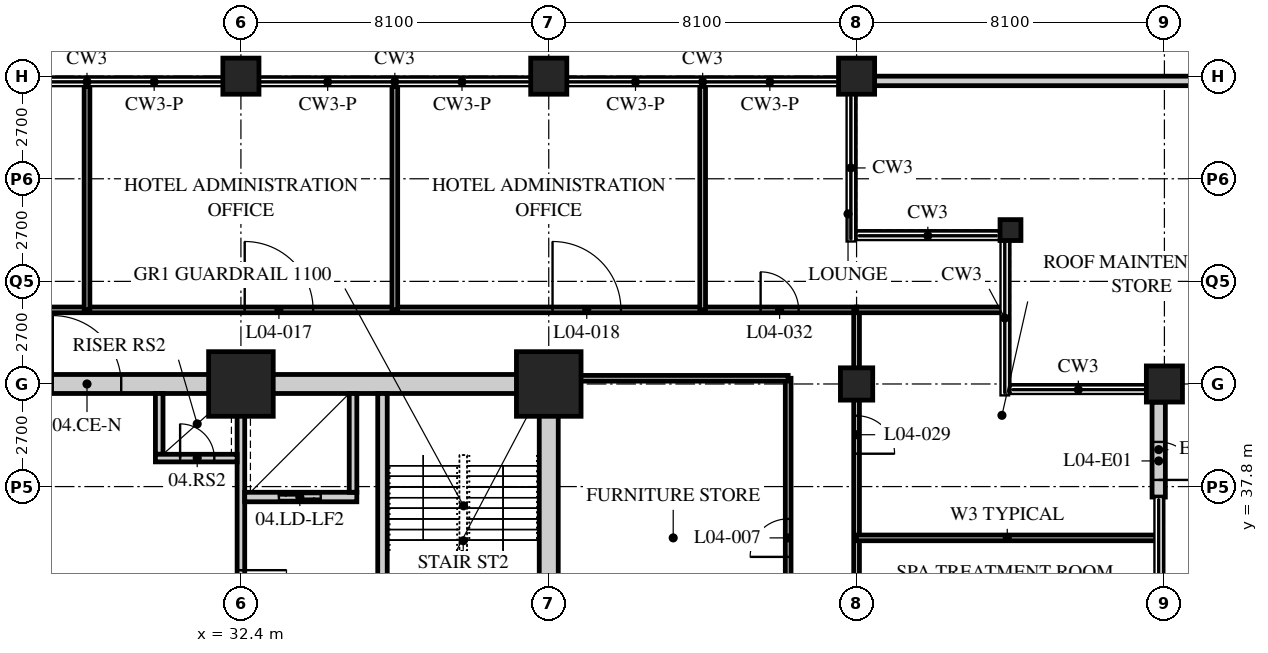
"""IFC4 building model, lengths in metres.
Left out: names, types, materials, properties, quantities, classifications, styles, units other than length and angle.
Written with IfcOpenShell. Run it as: python <this file> out.ifc"""

import sys

from ifc_helpers import new_model, si_unit, direction, frame, frame_2d, origin, origin_2d, place, context, subcontext, project, spatial, rectangle, hollow_rectangle, extrude, element, fill, save


model = new_model("IFC4")
c1 = context("Model", 3, precision=1e-05, world=origin(), true_north=direction((0.0, 1.0)))
c2 = subcontext(c1, "Body", "Model", "MODEL_VIEW")
j1 = project(units=[si_unit("LENGTHUNIT", "METRE"), si_unit("PLANEANGLEUNIT", "RADIAN")], contexts=[c1])
p1 = place(None, origin())
s1 = spatial("IfcSite", under=j1, at=p1, CompositionType="ELEMENT")
p2 = place(p1, origin())
s2 = spatial("IfcBuilding", under=s1, at=p2, CompositionType="ELEMENT")
p3 = place(p2, frame((0.0, 0.0, 22.2)))
s3 = spatial("IfcBuildingStorey", under=s2, at=p3, CompositionType="ELEMENT", Elevation=22.2)
p4 = place(p3, frame((32.4, 40.5, 0.0), z_axis=(0.0, 0.0, 1.0), x_axis=(1.0, 0.0, 0.0)))
e1 = element("IfcColumn", 1, at=p4, inside=s3, PredefinedType="COLUMN", context=c2, shape_type="SweptSolid", body=[
    extrude(hollow_rectangle(XDim=1.7, YDim=1.7, WallThickness=0.16, at=origin_2d()), origin(), (0.0, 0.0, 1.0), 5.4),
])
p5 = place(p3, frame((32.4, 48.6, 0.0), z_axis=(0.0, 0.0, 1.0), x_axis=(1.0, 0.0, 0.0)))
e2 = element("IfcColumn", 2, at=p5, inside=s3, PredefinedType="COLUMN", context=c2, shape_type="SweptSolid", body=[
    extrude(hollow_rectangle(XDim=0.95, YDim=0.95, WallThickness=0.1, at=origin_2d()), origin(), (0.0, 0.0, 1.0), 5.4),
])
p6 = place(p3, frame((40.5, 40.5, 0.0), z_axis=(0.0, 0.0, 1.0), x_axis=(1.0, 0.0, 0.0)))
e3 = element("IfcColumn", 3, at=p6, inside=s3, PredefinedType="COLUMN", context=c2, shape_type="SweptSolid", body=[
    extrude(hollow_rectangle(XDim=1.7, YDim=1.7, WallThickness=0.16, at=origin_2d()), origin(), (0.0, 0.0, 1.0), 5.4),
])
p7 = place(p3, frame((40.5, 48.6, 0.0), z_axis=(0.0, 0.0, 1.0), x_axis=(1.0, 0.0, 0.0)))
e4 = element("IfcColumn", 4, at=p7, inside=s3, PredefinedType="COLUMN", context=c2, shape_type="SweptSolid", body=[
    extrude(hollow_rectangle(XDim=0.95, YDim=0.95, WallThickness=0.1, at=origin_2d()), origin(), (0.0, 0.0, 1.0), 5.4),
])
p8 = place(p3, frame((48.6, 40.5, 0.0), z_axis=(0.0, 0.0, 1.0), x_axis=(1.0, 0.0, 0.0)))
e5 = element("IfcColumn", 5, at=p8, inside=s3, PredefinedType="COLUMN", context=c2, shape_type="SweptSolid", body=[
    extrude(hollow_rectangle(XDim=0.85, YDim=0.85, WallThickness=0.085, at=origin_2d()), origin(), (0.0, 0.0, 1.0), 5.4),
])
p9 = place(p3, frame((48.6, 48.6, 0.0), z_axis=(0.0, 0.0, 1.0), x_axis=(1.0, 0.0, 0.0)))
e6 = element("IfcColumn", 6, at=p9, inside=s3, PredefinedType="COLUMN", context=c2, shape_type="SweptSolid", body=[
    extrude(hollow_rectangle(XDim=0.95, YDim=0.95, WallThickness=0.1, at=origin_2d()), origin(), (0.0, 0.0, 1.0), 5.4),
])
p10 = place(p3, frame((52.65, 44.55, 0.0), z_axis=(0.0, 0.0, 1.0), x_axis=(1.0, 0.0, 0.0)))
e7 = element("IfcColumn", 7, at=p10, inside=s3, PredefinedType="COLUMN", context=c2, shape_type="SweptSolid", body=[
    extrude(hollow_rectangle(XDim=0.55, YDim=0.55, WallThickness=0.05, at=origin_2d()), origin(), (0.0, 0.0, 1.0), 5.4),
])
p11 = place(p3, frame((56.7, 40.5, 0.0), z_axis=(0.0, 0.0, 1.0), x_axis=(1.0, 0.0, 0.0)))
e8 = element("IfcColumn", 8, at=p11, inside=s3, PredefinedType="COLUMN", context=c2, shape_type="SweptSolid", body=[
    extrude(hollow_rectangle(XDim=0.95, YDim=0.95, WallThickness=0.1, at=origin_2d()), origin(), (0.0, 0.0, 1.0), 5.4),
])
p12 = place(p3, frame((56.55, 37.525, 0.0), z_axis=(0.0, 0.0, 1.0), x_axis=(0.0, 1.0, 0.0)))
e9 = element("IfcWall", 9, at=p12, inside=s3, PredefinedType="SOLIDWALL", context=c2, shape_type="SweptSolid", body=[
    extrude(rectangle(XDim=2.495, YDim=0.35, at=frame_2d((1.248, 0.0))), origin(), (0.0, 0.0, 1.0), 4.428),
])
p13 = place(p12, frame((0.45, 0.0, 0.0)))
e10 = element("IfcOpeningElement", 10, at=p13, cuts=e9, PredefinedType="OPENING", context=c2, shape_type="SweptSolid", body=[
    extrude(rectangle(XDim=1.0, YDim=2.1, at=frame_2d((0.5, 1.05))), frame((0.0, 0.185, 0.0), z_axis=(0.0, -1.0, 0.0), x_axis=(1.0, 0.0, 0.0)), (0.0, 0.0, 1.0), 0.37),
])
p14 = place(p3, frame((64.55, 48.475, 0.0), z_axis=(0.0, 0.0, 1.0), x_axis=(-1.0, 0.0, 0.0)))
e11 = element("IfcWall", 11, at=p14, inside=s3, PredefinedType="PARAPET", context=c2, shape_type="SweptSolid", body=[
    extrude(rectangle(XDim=15.95, YDim=0.25, at=frame_2d((7.975, 0.0))), origin(), (0.0, 0.0, 1.0), 1.38),
])
p15 = place(p3, frame((8.1, 42.45, 0.0), z_axis=(0.0, 0.0, 1.0), x_axis=(1.0, 0.0, 0.0)))
e12 = element("IfcWall", 12, at=p15, inside=s3, PredefinedType="PARTITIONING", context=c2, shape_type="SweptSolid", body=[
    extrude(rectangle(XDim=40.5, YDim=0.15, at=frame_2d((20.25, 0.0))), origin(), (0.0, 0.0, 1.0), 5.19),
])
p16 = place(p15, frame((8.2, 0.0, 0.0)))
e13 = element("IfcOpeningElement", 13, at=p16, cuts=e12, PredefinedType="OPENING", context=c2, shape_type="SweptSolid", body=[
    extrude(rectangle(XDim=1.8, YDim=2.4, at=frame_2d((0.9, 1.2))), frame((0.0, 0.085, 0.0), z_axis=(0.0, -1.0, 0.0), x_axis=(1.0, 0.0, 0.0)), (0.0, 0.0, 1.0), 0.17),
])
p17 = place(p15, frame((16.3, 0.0, 0.0)))
e14 = element("IfcOpeningElement", 14, at=p17, cuts=e12, PredefinedType="OPENING", context=c2, shape_type="SweptSolid", body=[
    extrude(rectangle(XDim=1.8, YDim=2.4, at=frame_2d((0.9, 1.2))), frame((0.0, 0.085, 0.0), z_axis=(0.0, -1.0, 0.0), x_axis=(1.0, 0.0, 0.0)), (0.0, 0.0, 1.0), 0.17),
])
p18 = place(p15, frame((24.4, 0.0, 0.0)))
e15 = element("IfcOpeningElement", 15, at=p18, cuts=e12, PredefinedType="OPENING", context=c2, shape_type="SweptSolid", body=[
    extrude(rectangle(XDim=1.8, YDim=2.4, at=frame_2d((0.9, 1.2))), frame((0.0, 0.085, 0.0), z_axis=(0.0, -1.0, 0.0), x_axis=(1.0, 0.0, 0.0)), (0.0, 0.0, 1.0), 0.17),
])
p19 = place(p15, frame((32.5, 0.0, 0.0)))
e16 = element("IfcOpeningElement", 16, at=p19, cuts=e12, PredefinedType="OPENING", context=c2, shape_type="SweptSolid", body=[
    extrude(rectangle(XDim=1.8, YDim=2.4, at=frame_2d((0.9, 1.2))), frame((0.0, 0.085, 0.0), z_axis=(0.0, -1.0, 0.0), x_axis=(1.0, 0.0, 0.0)), (0.0, 0.0, 1.0), 0.17),
])
p20 = place(p15, frame((37.975, 0.0, 0.0)))
e17 = element("IfcOpeningElement", 17, at=p20, cuts=e12, PredefinedType="OPENING", context=c2, shape_type="SweptSolid", body=[
    extrude(rectangle(XDim=1.0, YDim=2.1, at=frame_2d((0.5, 1.05))), frame((0.0, 0.085, 0.0), z_axis=(0.0, -1.0, 0.0), x_axis=(1.0, 0.0, 0.0)), (0.0, 0.0, 1.0), 0.17),
])
p21 = place(p15, frame((1.525, 0.0, 0.0)))
e18 = element("IfcOpeningElement", 18, at=p21, cuts=e12, PredefinedType="OPENING", context=c2, shape_type="SweptSolid", body=[
    extrude(rectangle(XDim=1.0, YDim=2.1, at=frame_2d((0.5, 1.05))), frame((0.0, 0.085, 0.0), z_axis=(0.0, -1.0, 0.0), x_axis=(1.0, 0.0, 0.0)), (0.0, 0.0, 1.0), 0.17),
])
p22 = place(p3, frame((48.6, 8.065, 0.0), z_axis=(0.0, 0.0, 1.0), x_axis=(0.0, 1.0, 0.0)))
e19 = element("IfcWall", 19, at=p22, inside=s3, PredefinedType="PARTITIONING", context=c2, shape_type="SweptSolid", body=[
    extrude(rectangle(XDim=34.385, YDim=0.15, at=frame_2d((17.192, 0.0))), origin(), (0.0, 0.0, 1.0), 4.428),
])
p23 = place(p22, frame((3.15, 0.0, 0.0)))
e20 = element("IfcOpeningElement", 20, at=p23, cuts=e19, PredefinedType="OPENING", context=c2, shape_type="SweptSolid", body=[
    extrude(rectangle(XDim=1.8, YDim=2.4, at=frame_2d((0.9, 1.2))), frame((0.0, 0.085, 0.0), z_axis=(0.0, -1.0, 0.0), x_axis=(1.0, 0.0, 0.0)), (0.0, 0.0, 1.0), 0.17),
])
p24 = place(p22, frame((9.625, 0.0, 0.0)))
e21 = element("IfcOpeningElement", 21, at=p24, cuts=e19, PredefinedType="OPENING", context=c2, shape_type="SweptSolid", body=[
    extrude(rectangle(XDim=1.0, YDim=2.1, at=frame_2d((0.5, 1.05))), frame((0.0, 0.085, 0.0), z_axis=(0.0, -1.0, 0.0), x_axis=(1.0, 0.0, 0.0)), (0.0, 0.0, 1.0), 0.17),
])
p25 = place(p22, frame((13.675, 0.0, 0.0)))
e22 = element("IfcOpeningElement", 22, at=p25, cuts=e19, PredefinedType="OPENING", context=c2, shape_type="SweptSolid", body=[
    extrude(rectangle(XDim=1.0, YDim=2.1, at=frame_2d((0.5, 1.05))), frame((0.0, 0.085, 0.0), z_axis=(0.0, -1.0, 0.0), x_axis=(1.0, 0.0, 0.0)), (0.0, 0.0, 1.0), 0.17),
])
p26 = place(p22, frame((17.725, 0.0, 0.0)))
e23 = element("IfcOpeningElement", 23, at=p26, cuts=e19, PredefinedType="OPENING", context=c2, shape_type="SweptSolid", body=[
    extrude(rectangle(XDim=1.0, YDim=2.1, at=frame_2d((0.5, 1.05))), frame((0.0, 0.085, 0.0), z_axis=(0.0, -1.0, 0.0), x_axis=(1.0, 0.0, 0.0)), (0.0, 0.0, 1.0), 0.17),
])
p27 = place(p22, frame((21.775, 0.0, 0.0)))
e24 = element("IfcOpeningElement", 24, at=p27, cuts=e19, PredefinedType="OPENING", context=c2, shape_type="SweptSolid", body=[
    extrude(rectangle(XDim=1.0, YDim=2.1, at=frame_2d((0.5, 1.05))), frame((0.0, 0.085, 0.0), z_axis=(0.0, -1.0, 0.0), x_axis=(1.0, 0.0, 0.0)), (0.0, 0.0, 1.0), 0.17),
])
p28 = place(p22, frame((25.825, 0.0, 0.0)))
e25 = element("IfcOpeningElement", 25, at=p28, cuts=e19, PredefinedType="OPENING", context=c2, shape_type="SweptSolid", body=[
    extrude(rectangle(XDim=1.0, YDim=2.1, at=frame_2d((0.5, 1.05))), frame((0.0, 0.085, 0.0), z_axis=(0.0, -1.0, 0.0), x_axis=(1.0, 0.0, 0.0)), (0.0, 0.0, 1.0), 0.17),
])
p29 = place(p22, frame((30.6, 0.0, 0.0)))
e26 = element("IfcOpeningElement", 26, at=p29, cuts=e19, PredefinedType="OPENING", context=c2, shape_type="SweptSolid", body=[
    extrude(rectangle(XDim=1.0, YDim=2.1, at=frame_2d((0.5, 1.05))), frame((0.0, 0.085, 0.0), z_axis=(0.0, -1.0, 0.0), x_axis=(1.0, 0.0, 0.0)), (0.0, 0.0, 1.0), 0.17),
])
p30 = place(p3, frame((46.8, 9.9, 0.0), z_axis=(0.0, 0.0, 1.0), x_axis=(0.0, 1.0, 0.0)))
e27 = element("IfcWall", 27, at=p30, inside=s3, PredefinedType="PARTITIONING", context=c2, shape_type="SweptSolid", body=[
    extrude(rectangle(XDim=30.75, YDim=0.15, at=frame_2d((15.375, 0.0))), origin(), (0.0, 0.0, 1.0), 5.19),
])
p31 = place(p30, frame((15.175, 0.0, 0.0)))
e28 = element("IfcOpeningElement", 28, at=p31, cuts=e27, PredefinedType="OPENING", context=c2, shape_type="SweptSolid", body=[
    extrude(rectangle(XDim=0.85, YDim=2.1, at=frame_2d((0.425, 1.05))), frame((0.0, 0.085, 0.0), z_axis=(0.0, -1.0, 0.0), x_axis=(1.0, 0.0, 0.0)), (0.0, 0.0, 1.0), 0.17),
])
p32 = place(p30, frame((19.15, 0.0, 0.0)))
e29 = element("IfcOpeningElement", 29, at=p32, cuts=e27, PredefinedType="OPENING", context=c2, shape_type="SweptSolid", body=[
    extrude(rectangle(XDim=1.0, YDim=2.1, at=frame_2d((0.5, 1.05))), frame((0.0, 0.085, 0.0), z_axis=(0.0, -1.0, 0.0), x_axis=(1.0, 0.0, 0.0)), (0.0, 0.0, 1.0), 0.17),
])
p33 = place(p30, frame((26.05, 0.0, 0.0)))
e30 = element("IfcOpeningElement", 30, at=p33, cuts=e27, PredefinedType="OPENING", context=c2, shape_type="SweptSolid", body=[
    extrude(rectangle(XDim=1.0, YDim=2.1, at=frame_2d((0.5, 1.05))), frame((0.0, 0.085, 0.0), z_axis=(0.0, -1.0, 0.0), x_axis=(1.0, 0.0, 0.0)), (0.0, 0.0, 1.0), 0.17),
])
p34 = place(p3, frame((46.8, 40.65, 0.0), z_axis=(0.0, 0.0, 1.0), x_axis=(-1.0, 0.0, 0.0)))
e31 = element("IfcWall", 31, at=p34, inside=s3, PredefinedType="PARTITIONING", context=c2, shape_type="SweptSolid", body=[
    extrude(rectangle(XDim=6.168, YDim=0.15, at=frame_2d((3.084, 0.0))), origin(), (0.0, 0.0, 1.0), 4.428),
])
for number, where, z_axis, x_axis in (
    (32, (28.35, 42.45, 0.0), (0.0, 0.0, 1.0), (0.0, 1.0, 0.0)),
    (33, (36.45, 42.45, 0.0), (0.0, 0.0, 1.0), (0.0, 1.0, 0.0)),
):
    element("IfcWall", number, at=place(p3, frame(where, z_axis=z_axis, x_axis=x_axis)), inside=s3, PredefinedType="PARTITIONING", context=c2, shape_type="SweptSolid", body=[
        extrude(rectangle(XDim=5.885, YDim=0.15, at=frame_2d((2.942, 0.0))), origin(), (0.0, 0.0, 1.0), 5.19),
    ])
p35 = place(p3, frame((48.6, 36.45, 0.0), z_axis=(0.0, 0.0, 1.0), x_axis=(1.0, 0.0, 0.0)))
e34 = element("IfcWall", 34, at=p35, inside=s3, PredefinedType="PARTITIONING", context=c2, shape_type="SweptSolid", body=[
    extrude(rectangle(XDim=7.93, YDim=0.15, at=frame_2d((3.965, 0.0))), origin(), (0.0, 0.0, 1.0), 5.19),
])
p36 = place(p3, frame((48.6, 42.45, 0.0), z_axis=(0.0, 0.0, 1.0), x_axis=(1.0, 0.0, 0.0)))
e35 = element("IfcWall", 35, at=p36, inside=s3, PredefinedType="PARTITIONING", context=c2, shape_type="SweptSolid", body=[
    extrude(rectangle(XDim=3.88, YDim=0.15, at=frame_2d((1.94, 0.0))), origin(), (0.0, 0.0, 1.0), 5.19),
])
p37 = place(p3, frame((44.55, 42.45, 0.0), z_axis=(0.0, 0.0, 1.0), x_axis=(0.0, 1.0, 0.0)))
e36 = element("IfcWall", 36, at=p37, inside=s3, PredefinedType="PARTITIONING", context=c2, shape_type="SweptSolid", body=[
    extrude(rectangle(XDim=5.885, YDim=0.15, at=frame_2d((2.942, 0.0))), origin(), (0.0, 0.0, 1.0), 5.19),
])
p38 = place(p3, frame((15.95, 40.5, 0.0), z_axis=(0.0, 0.0, 1.0), x_axis=(1.0, 0.0, 0.0)))
e37 = element("IfcWall", 37, at=p38, inside=s3, PredefinedType="SOLIDWALL", context=c2, shape_type="SweptSolid", body=[
    extrude(rectangle(XDim=24.8, YDim=0.5, at=frame_2d((12.4, 0.0))), origin(), (0.0, 0.0, 1.0), 4.428),
])
p39 = place(p38, frame((11.5, 0.0, 0.0)))
e38 = element("IfcOpeningElement", 38, at=p39, cuts=e37, PredefinedType="OPENING", context=c2, shape_type="SweptSolid", body=[
    extrude(rectangle(XDim=1.8, YDim=2.4, at=frame_2d((0.9, 1.2))), frame((0.0, 0.26, 0.0), z_axis=(0.0, -1.0, 0.0), x_axis=(1.0, 0.0, 0.0)), (0.0, 0.0, 1.0), 0.52),
])
p40 = place(p3, frame((40.5, 24.55, 0.0), z_axis=(0.0, 0.0, 1.0), x_axis=(0.0, 1.0, 0.0)))
e39 = element("IfcWall", 39, at=p40, inside=s3, PredefinedType="SOLIDWALL", context=c2, shape_type="SweptSolid", body=[
    extrude(rectangle(XDim=15.7, YDim=0.5, at=frame_2d((7.85, 0.0))), origin(), (0.0, 0.0, 1.0), 4.428),
])
p41 = place(p3, frame((32.4, 32.5, 0.0), z_axis=(0.0, 0.0, 1.0), x_axis=(0.0, 1.0, 0.0)))
e40 = element("IfcWall", 40, at=p41, inside=s3, PredefinedType="SOLIDWALL", context=c2, shape_type="SweptSolid", body=[
    extrude(rectangle(XDim=7.75, YDim=0.2, at=frame_2d((3.875, 0.0))), origin(), (0.0, 0.0, 1.0), 4.428),
])
p42 = place(p41, frame((1.9, 0.0, 0.0)))
e41 = element("IfcOpeningElement", 41, at=p42, cuts=e40, PredefinedType="OPENING", context=c2, shape_type="SweptSolid", body=[
    extrude(rectangle(XDim=1.2, YDim=2.1, at=frame_2d((0.6, 1.05))), frame((0.0, 0.11, 0.0), z_axis=(0.0, -1.0, 0.0), x_axis=(1.0, 0.0, 0.0)), (0.0, 0.0, 1.0), 0.22),
])
p43 = place(p3, frame((36.125, 32.5, 0.0), z_axis=(0.0, 0.0, 1.0), x_axis=(0.0, 1.0, 0.0)))
e42 = element("IfcWall", 42, at=p43, inside=s3, PredefinedType="SOLIDWALL", context=c2, shape_type="SweptSolid", body=[
    extrude(rectangle(XDim=7.75, YDim=0.25, at=frame_2d((3.875, 0.0))), origin(), (0.0, 0.0, 1.0), 5.19),
])
p44 = place(p43, frame((0.45, 0.0, 0.0)))
e43 = element("IfcOpeningElement", 43, at=p44, cuts=e42, PredefinedType="OPENING", context=c2, shape_type="SweptSolid", body=[
    extrude(rectangle(XDim=1.2, YDim=2.1, at=frame_2d((0.6, 1.05))), frame((0.0, 0.135, 0.0), z_axis=(0.0, -1.0, 0.0), x_axis=(1.0, 0.0, 0.0)), (0.0, 0.0, 1.0), 0.27),
])
p45 = place(p3, frame((32.5, 37.525, 0.0), z_axis=(0.0, 0.0, 1.0), x_axis=(1.0, 0.0, 0.0)))
e44 = element("IfcWall", 44, at=p45, inside=s3, PredefinedType="SOLIDWALL", context=c2, shape_type="SweptSolid", body=[
    extrude(rectangle(XDim=2.95, YDim=0.25, at=frame_2d((1.475, 0.0))), origin(), (0.0, 0.0, 1.0), 5.19),
])
p46 = place(p45, frame((0.9, 0.0, 0.0)))
e45 = element("IfcOpeningElement", 45, at=p46, cuts=e44, PredefinedType="OPENING", context=c2, shape_type="SweptSolid", body=[
    extrude(rectangle(XDim=1.1, YDim=2.4, at=frame_2d((0.55, 1.2))), frame((0.0, 0.135, 0.0), z_axis=(0.0, -1.0, 0.0), x_axis=(1.0, 0.0, 0.0)), (0.0, 0.0, 1.0), 0.27),
])
p47 = place(p3, frame((35.35, 37.65, 0.0), z_axis=(0.0, 0.0, 1.0), x_axis=(0.0, 1.0, 0.0)))
e46 = element("IfcWall", 46, at=p47, inside=s3, PredefinedType="SOLIDWALL", context=c2, shape_type="SweptSolid", body=[
    extrude(rectangle(XDim=2.6, YDim=0.2, at=frame_2d((1.3, 0.0))), origin(), (0.0, 0.0, 1.0), 5.19),
])
p48 = place(p3, frame((30.25, 38.65, 0.0), z_axis=(0.0, 0.0, 1.0), x_axis=(0.0, 1.0, 0.0)))
e47 = element("IfcWall", 47, at=p48, inside=s3, PredefinedType="SOLIDWALL", context=c2, shape_type="SweptSolid", body=[
    extrude(rectangle(XDim=1.6, YDim=0.2, at=frame_2d((0.8, 0.0))), origin(), (0.0, 0.0, 1.0), 5.19),
])
p49 = place(p3, frame((30.15, 38.55, 0.0), z_axis=(0.0, 0.0, 1.0), x_axis=(1.0, 0.0, 0.0)))
e48 = element("IfcWall", 48, at=p49, inside=s3, PredefinedType="SOLIDWALL", context=c2, shape_type="SweptSolid", body=[
    extrude(rectangle(XDim=2.15, YDim=0.2, at=frame_2d((1.075, 0.0))), origin(), (0.0, 0.0, 1.0), 5.19),
])
p50 = place(p49, frame((0.65, 0.0, 0.0)))
e49 = element("IfcOpeningElement", 49, at=p50, cuts=e48, PredefinedType="OPENING", context=c2, shape_type="SweptSolid", body=[
    extrude(rectangle(XDim=0.9, YDim=2.1, at=frame_2d((0.45, 1.05))), frame((0.0, 0.11, 0.0), z_axis=(0.0, -1.0, 0.0), x_axis=(1.0, 0.0, 0.0)), (0.0, 0.0, 1.0), 0.22),
])
p51 = place(p13, origin())
e50 = element("IfcDoor", 50, at=p51, inside=s3, OperationType="SINGLE_SWING_RIGHT", PredefinedType="DOOR", context=c2, shape_type="SweptSolid", body=[
    extrude(rectangle(XDim=1.0, YDim=2.1, at=frame_2d((0.5, 1.05))), frame((0.0, 0.025, 0.0), z_axis=(0.0, -1.0, 0.0), x_axis=(1.0, 0.0, 0.0)), (0.0, 0.0, 1.0), 0.05),
])
fill(e10, e50)
p52 = place(p33, origin())
e51 = element("IfcDoor", 51, at=p52, inside=s3, OperationType="SINGLE_SWING_LEFT", PredefinedType="DOOR", context=c2, shape_type="SweptSolid", body=[
    extrude(rectangle(XDim=1.0, YDim=2.1, at=frame_2d((0.5, 1.05))), frame((0.0, 0.025, 0.0), z_axis=(0.0, -1.0, 0.0), x_axis=(1.0, 0.0, 0.0)), (0.0, 0.0, 1.0), 0.05),
])
fill(e30, e51)
p53 = place(p18, origin())
e52 = element("IfcDoor", 52, at=p53, inside=s3, OperationType="DOUBLE_DOOR_SINGLE_SWING", PredefinedType="DOOR", context=c2, shape_type="SweptSolid", body=[
    extrude(rectangle(XDim=1.8, YDim=2.4, at=frame_2d((0.9, 1.2))), frame((0.0, 0.025, 0.0), z_axis=(0.0, -1.0, 0.0), x_axis=(1.0, 0.0, 0.0)), (0.0, 0.0, 1.0), 0.05),
])
fill(e15, e52)
p54 = place(p19, origin())
e53 = element("IfcDoor", 53, at=p54, inside=s3, OperationType="DOUBLE_DOOR_SINGLE_SWING", PredefinedType="DOOR", context=c2, shape_type="SweptSolid", body=[
    extrude(rectangle(XDim=1.8, YDim=2.4, at=frame_2d((0.9, 1.2))), frame((0.0, 0.025, 0.0), z_axis=(0.0, -1.0, 0.0), x_axis=(1.0, 0.0, 0.0)), (0.0, 0.0, 1.0), 0.05),
])
fill(e16, e53)
p55 = place(p29, origin())
e54 = element("IfcDoor", 54, at=p55, inside=s3, OperationType="SINGLE_SWING_RIGHT", PredefinedType="DOOR", context=c2, shape_type="SweptSolid", body=[
    extrude(rectangle(XDim=1.0, YDim=2.1, at=frame_2d((0.5, 1.05))), frame((0.0, 0.025, 0.0), z_axis=(0.0, -1.0, 0.0), x_axis=(1.0, 0.0, 0.0)), (0.0, 0.0, 1.0), 0.05),
])
fill(e26, e54)
p56 = place(p20, origin())
e55 = element("IfcDoor", 55, at=p56, inside=s3, OperationType="SINGLE_SWING_LEFT", PredefinedType="DOOR", context=c2, shape_type="SweptSolid", body=[
    extrude(rectangle(XDim=1.0, YDim=2.1, at=frame_2d((0.5, 1.05))), frame((0.0, 0.025, 0.0), z_axis=(0.0, -1.0, 0.0), x_axis=(1.0, 0.0, 0.0)), (0.0, 0.0, 1.0), 0.05),
])
fill(e17, e55)
p57 = place(p42, origin())
e56 = element("IfcDoor", 56, at=p57, inside=s3, OperationType="SINGLE_SWING_LEFT", PredefinedType="DOOR", context=c2, shape_type="SweptSolid", body=[
    extrude(rectangle(XDim=1.2, YDim=2.1, at=frame_2d((0.6, 1.05))), frame((0.0, 0.025, 0.0), z_axis=(0.0, -1.0, 0.0), x_axis=(1.0, 0.0, 0.0)), (0.0, 0.0, 1.0), 0.05),
])
fill(e41, e56)
p58 = place(p50, origin())
e57 = element("IfcDoor", 57, at=p58, inside=s3, OperationType="SINGLE_SWING_LEFT", PredefinedType="DOOR", context=c2, shape_type="SweptSolid", body=[
    extrude(rectangle(XDim=0.9, YDim=2.1, at=frame_2d((0.45, 1.05))), frame((0.0, 0.025, 0.0), z_axis=(0.0, -1.0, 0.0), x_axis=(1.0, 0.0, 0.0)), (0.0, 0.0, 1.0), 0.05),
])
fill(e49, e57)
p59 = place(p46, origin())
e58 = element("IfcDoor", 58, at=p59, inside=s3, OperationType="DOUBLE_DOOR_SLIDING", PredefinedType="DOOR", context=c2, shape_type="SweptSolid", body=[
    extrude(rectangle(XDim=1.1, YDim=2.4, at=frame_2d((0.55, 1.2))), frame((0.0, 0.025, 0.0), z_axis=(0.0, -1.0, 0.0), x_axis=(1.0, 0.0, 0.0)), (0.0, 0.0, 1.0), 0.05),
])
fill(e45, e58)
p60 = place(p39, origin())
e59 = element("IfcDoor", 59, at=p60, inside=s3, OperationType="DOUBLE_DOOR_SINGLE_SWING", PredefinedType="DOOR", context=c2, shape_type="SweptSolid", body=[
    extrude(rectangle(XDim=1.8, YDim=2.4, at=frame_2d((0.9, 1.2))), frame((0.0, 0.025, 0.0), z_axis=(0.0, -1.0, 0.0), x_axis=(1.0, 0.0, 0.0)), (0.0, 0.0, 1.0), 0.05),
])
fill(e38, e59)
save(model, sys.argv[1])
